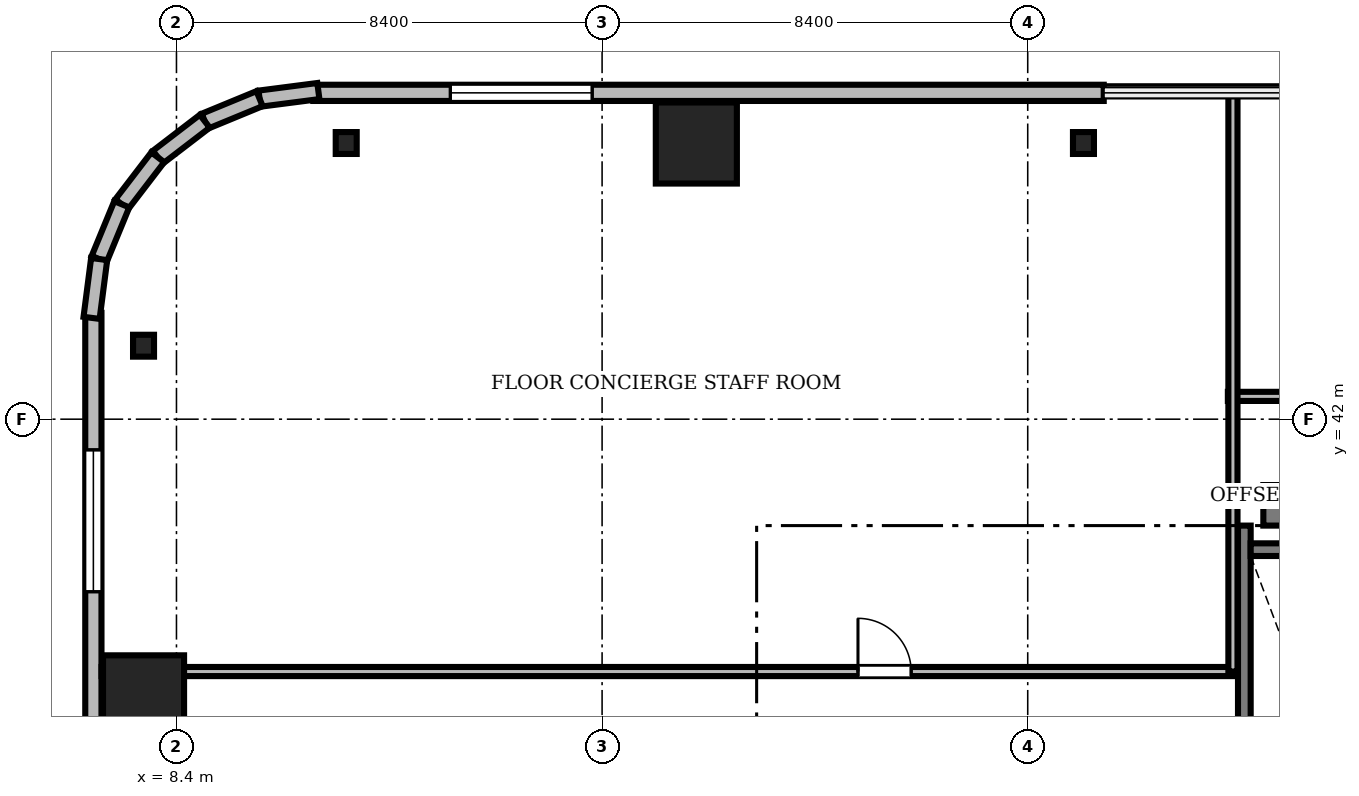
"""IFC4 building model, lengths in metres.
Left out: names, types, materials, properties, quantities, classifications, styles, units other than length and angle.
Written with IfcOpenShell. Run it as: python <this file> out.ifc"""

import sys

from ifc_helpers import new_model, si_unit, direction, frame, frame_2d, origin, origin_2d, place, context, subcontext, project, spatial, rectangle, i_section, extrude, source, transform, mapped, element, fill, save


model = new_model("IFC4")
c1 = context("Model", 3, precision=1e-05, world=origin(), true_north=direction((0.0, 1.0)))
c2 = subcontext(c1, "Body", "Model", "MODEL_VIEW")
j1 = project(units=[si_unit("LENGTHUNIT", "METRE"), si_unit("PLANEANGLEUNIT", "RADIAN")], contexts=[c1])
p1 = place(None, origin())
s1 = spatial("IfcSite", under=j1, at=p1, CompositionType="ELEMENT")
p2 = place(p1, origin())
s2 = spatial("IfcBuilding", under=s1, at=p2, CompositionType="ELEMENT")
p3 = place(p2, frame((0.0, 0.0, 133.5)))
s3 = spatial("IfcBuildingStorey", under=s2, at=p3, CompositionType="ELEMENT", Elevation=133.5)
m1 = source(origin(), c2, "Body", "SweptSolid", [
    extrude(rectangle(XDim=17.52, YDim=0.8, at=frame_2d((8.76, 0.0))), origin(), (0.0, 0.0, 1.0), 3.46),
])
p4 = place(p3, frame((29.85, 40.3, 0.0), z_axis=(0.0, 0.0, 1.0), x_axis=(1.0, 0.0, 0.0)))
e1 = element("IfcWall", 1, at=p4, inside=s3, PredefinedType="SHEAR", context=c2, shape_type="MappedRepresentation", body=[
    mapped(m1, transform((0.0, 0.0, 0.0), scale=1.0)),
])
m2 = source(origin(), c2, "Body", "SweptSolid", [
    extrude(rectangle(XDim=1.6, YDim=1.6, at=origin_2d()), origin(), (0.0, 0.0, 1.0), 3.46),
])
for number, where, z_axis, x_axis in (
    (2, (18.66, 47.45, 0.0), (0.0, 0.0, 1.0), (1.0, 0.0, 0.0)),
    (3, (7.75, 36.54, 0.0), (0.0, 0.0, 1.0), (1.0, 0.0, 0.0)),
):
    element("IfcColumn", number, at=place(p3, frame(where, z_axis=z_axis, x_axis=x_axis)), inside=s3, PredefinedType="COLUMN", context=c2, shape_type="MappedRepresentation", body=[
        mapped(m2, transform((0.0, 0.0, 0.0), scale=1.0)),
    ])
m3 = source(origin(), c2, "Body", "SweptSolid", [
    extrude(i_section(OverallWidth=0.414, OverallDepth=0.432, WebThickness=0.026, FlangeThickness=0.04, FilletRadius=0.015, at=origin_2d()), origin(), (0.0, 0.0, 1.0), 3.46),
])
for number, where, z_axis, x_axis in (
    (4, (26.3, 47.45, 0.0), (0.0, 0.0, 1.0), (1.0, 0.0, 0.0)),
    (5, (11.75, 47.45, 0.0), (0.0, 0.0, 1.0), (1.0, 0.0, 0.0)),
    (6, (7.75, 43.45, 0.0), (0.0, 0.0, 1.0), (1.0, 0.0, 0.0)),
):
    element("IfcColumn", number, at=place(p3, frame(where, z_axis=z_axis, x_axis=x_axis)), inside=s3, PredefinedType="COLUMN", context=c2, shape_type="MappedRepresentation", body=[
        mapped(m3, transform((0.0, 0.0, 0.0), scale=1.0)),
    ])
m4 = source(origin(), c2, "Body", "SweptSolid", [
    extrude(rectangle(XDim=15.6, YDim=0.32, at=frame_2d((7.8, 0.0))), origin(), (0.0, 0.0, 1.0), 3.46),
])
p5 = place(p3, frame((26.7, 48.44, 0.0), z_axis=(0.0, 0.0, 1.0), x_axis=(-1.0, 0.0, 0.0)))
e7 = element("IfcWall", 7, at=p5, inside=s3, PredefinedType="SOLIDWALL", context=c2, shape_type="MappedRepresentation", body=[
    mapped(m4, transform((0.0, 0.0, 0.0), scale=1.0)),
])
m5 = source(origin(), c2, "Body", "SweptSolid", [
    extrude(rectangle(XDim=2.8, YDim=2.4, at=frame_2d((1.4, 1.2))), frame((0.0, 0.17, 0.0), z_axis=(0.0, -1.0, 0.0), x_axis=(1.0, 0.0, 0.0)), (0.0, 0.0, 1.0), 0.34),
])
p6 = place(p5, frame((10.095, 0.0, 0.72)))
e8 = element("IfcOpeningElement", 8, at=p6, cuts=e7, PredefinedType="OPENING", context=c2, shape_type="MappedRepresentation", body=[
    mapped(m5, transform((0.0, 0.0, 0.0), scale=1.0)),
])
m6 = source(origin(), c2, "Body", "SweptSolid", [
    extrude(rectangle(XDim=15.6, YDim=0.32, at=frame_2d((7.8, 0.0))), origin(), (0.0, 0.0, 1.0), 3.46),
])
p7 = place(p3, frame((6.76, 44.1, 0.0), z_axis=(0.0, 0.0, 1.0), x_axis=(0.0, -1.0, 0.0)))
e9 = element("IfcWall", 9, at=p7, inside=s3, PredefinedType="SOLIDWALL", context=c2, shape_type="MappedRepresentation", body=[
    mapped(m6, transform((0.0, 0.0, 0.0), scale=1.0)),
])
m7 = source(origin(), c2, "Body", "SweptSolid", [
    extrude(rectangle(XDim=1.4, YDim=2.3, at=frame_2d((0.7, 1.15))), frame((0.0, 0.17, 0.0), z_axis=(0.0, -1.0, 0.0), x_axis=(1.0, 0.0, 0.0)), (0.0, 0.0, 1.0), 0.34),
])
p8 = place(p7, frame((9.61, 0.0, 0.0)))
e10 = element("IfcOpeningElement", 10, at=p8, cuts=e9, PredefinedType="OPENING", context=c2, shape_type="MappedRepresentation", body=[
    mapped(m7, transform((0.0, 0.0, 0.0), scale=1.0)),
])
p9 = place(p7, frame((2.705, 0.0, 0.72)))
e11 = element("IfcOpeningElement", 11, at=p9, cuts=e9, PredefinedType="OPENING", context=c2, shape_type="MappedRepresentation", body=[
    mapped(m5, transform((0.0, 0.0, 0.0), scale=1.0)),
])
m8 = source(origin(), c2, "Body", "SweptSolid", [
    extrude(rectangle(XDim=1.17, YDim=0.32, at=frame_2d((0.585, 0.0))), origin(), (0.0, 0.0, 1.0), 3.46),
])
p10 = place(p3, frame((11.2, 48.476, 0.0), z_axis=(0.0, 0.0, 1.0), x_axis=(-0.991735963317, -0.128295670475, 0.0)))
e12 = element("IfcWall", 12, at=p10, inside=s3, PredefinedType="SOLIDWALL", context=c2, shape_type="MappedRepresentation", body=[
    mapped(m8, transform((0.0, 0.0, 0.0), scale=1.0)),
])
m9 = source(origin(), c2, "Body", "SweptSolid", [
    extrude(rectangle(XDim=1.169, YDim=0.32, at=frame_2d((0.584, 0.0))), origin(), (0.0, 0.0, 1.0), 3.46),
])
p11 = place(p3, frame((10.04, 48.325, 0.0), z_axis=(0.0, 0.0, 1.0), x_axis=(-0.924552646638, -0.381054331552, 0.0)))
e13 = element("IfcWall", 13, at=p11, inside=s3, PredefinedType="SOLIDWALL", context=c2, shape_type="MappedRepresentation", body=[
    mapped(m9, transform((0.0, 0.0, 0.0), scale=1.0)),
])
m10 = source(origin(), c2, "Body", "SweptSolid", [
    extrude(rectangle(XDim=1.169, YDim=0.32, at=frame_2d((0.584, 0.0))), origin(), (0.0, 0.0, 1.0), 3.46),
])
p12 = place(p3, frame((8.959, 47.88, 0.0), z_axis=(0.0, 0.0, 1.0), x_axis=(-0.793663520347, -0.608356981114, 0.0)))
e14 = element("IfcWall", 14, at=p12, inside=s3, PredefinedType="SOLIDWALL", context=c2, shape_type="MappedRepresentation", body=[
    mapped(m10, transform((0.0, 0.0, 0.0), scale=1.0)),
])
m11 = source(origin(), c2, "Body", "SweptSolid", [
    extrude(rectangle(XDim=1.169, YDim=0.32, at=frame_2d((0.584, 0.0))), origin(), (0.0, 0.0, 1.0), 3.46),
])
p13 = place(p3, frame((8.031, 47.169, 0.0), z_axis=(0.0, 0.0, 1.0), x_axis=(-0.608387696831, -0.793639975269, 0.0)))
e15 = element("IfcWall", 15, at=p13, inside=s3, PredefinedType="SOLIDWALL", context=c2, shape_type="MappedRepresentation", body=[
    mapped(m11, transform((0.0, 0.0, 0.0), scale=1.0)),
])
p14 = place(p3, frame((7.32, 46.241, 0.0), z_axis=(0.0, 0.0, 1.0), x_axis=(-0.381054331552, -0.924552646638, 0.0)))
e16 = element("IfcWall", 16, at=p14, inside=s3, PredefinedType="SOLIDWALL", context=c2, shape_type="MappedRepresentation", body=[
    mapped(m9, transform((0.0, 0.0, 0.0), scale=1.0)),
])
p15 = place(p3, frame((6.875, 45.16, 0.0), z_axis=(0.0, 0.0, 1.0), x_axis=(-0.128295670475, -0.991735963317, 0.0)))
e17 = element("IfcWall", 17, at=p15, inside=s3, PredefinedType="SOLIDWALL", context=c2, shape_type="MappedRepresentation", body=[
    mapped(m8, transform((0.0, 0.0, 0.0), scale=1.0)),
])
m12 = source(origin(), c2, "Body", "SweptSolid", [
    extrude(rectangle(XDim=9.25, YDim=0.25, at=frame_2d((4.625, 0.0))), origin(), (0.0, 0.0, 1.0), 3.5),
])
p16 = place(p3, frame((29.475, 30.65, 0.0), z_axis=(0.0, 0.0, 1.0), x_axis=(0.0, 1.0, 0.0)))
e18 = element("IfcWall", 18, at=p16, inside=s3, PredefinedType="SOLIDWALL", context=c2, shape_type="MappedRepresentation", body=[
    mapped(m12, transform((0.0, 0.0, 0.0), scale=1.0)),
])
m13 = source(origin(), c2, "Body", "SweptSolid", [
    extrude(rectangle(XDim=3.15, YDim=0.25, at=frame_2d((1.575, 0.0))), origin(), (0.0, 0.0, 1.0), 3.5),
])
p17 = place(p3, frame((29.6, 39.425, 0.0), z_axis=(0.0, 0.0, 1.0), x_axis=(1.0, 0.0, 0.0)))
e19 = element("IfcWall", 19, at=p17, inside=s3, PredefinedType="SOLIDWALL", context=c2, shape_type="MappedRepresentation", body=[
    mapped(m13, transform((0.0, 0.0, 0.0), scale=1.0)),
])
m14 = source(origin(), c2, "Body", "SweptSolid", [
    extrude(rectangle(XDim=23.928, YDim=0.18, at=frame_2d((11.964, 0.0))), origin(), (0.0, 0.0, 1.0), 2.702),
])
p18 = place(p3, frame((29.15, 42.45, 0.0), z_axis=(0.0, 0.0, 1.0), x_axis=(1.0, 0.0, 0.0)))
e20 = element("IfcWall", 20, at=p18, inside=s3, PredefinedType="PARTITIONING", context=c2, shape_type="MappedRepresentation", body=[
    mapped(m14, transform((0.0, 0.0, 0.0), scale=1.0)),
])
m15 = source(origin(), c2, "Body", "SweptSolid", [
    extrude(rectangle(XDim=1.05, YDim=2.2, at=frame_2d((0.525, 1.1))), frame((0.0, 0.1, 0.0), z_axis=(0.0, -1.0, 0.0), x_axis=(1.0, 0.0, 0.0)), (0.0, 0.0, 1.0), 0.2),
])
p19 = place(p18, frame((4.5, 0.0, 0.0)))
e21 = element("IfcOpeningElement", 21, at=p19, cuts=e20, PredefinedType="OPENING", context=c2, shape_type="MappedRepresentation", body=[
    mapped(m15, transform((0.0, 0.0, 0.0), scale=1.0)),
])
m16 = source(origin(), c2, "Body", "SweptSolid", [
    extrude(rectangle(XDim=22.328, YDim=0.18, at=frame_2d((11.164, 0.0))), origin(), (0.0, 0.0, 1.0), 2.702),
])
p20 = place(p3, frame((6.922, 37.02, 0.0), z_axis=(0.0, 0.0, 1.0), x_axis=(1.0, 0.0, 0.0)))
e22 = element("IfcWall", 22, at=p20, inside=s3, PredefinedType="PARTITIONING", context=c2, shape_type="MappedRepresentation", body=[
    mapped(m16, transform((0.0, 0.0, 0.0), scale=1.0)),
])
p21 = place(p20, frame((14.928, 0.0, 0.0)))
e23 = element("IfcOpeningElement", 23, at=p21, cuts=e22, PredefinedType="OPENING", context=c2, shape_type="MappedRepresentation", body=[
    mapped(m15, transform((0.0, 0.0, 0.0), scale=1.0)),
])
m17 = source(origin(), c2, "Body", "SweptSolid", [
    extrude(rectangle(XDim=11.45, YDim=0.18, at=frame_2d((5.725, 0.0))), origin(), (0.0, 0.0, 1.0), 2.702),
])
p22 = place(p3, frame((29.25, 37.02, 0.0), z_axis=(0.0, 0.0, 1.0), x_axis=(0.0, 1.0, 0.0)))
e24 = element("IfcWall", 24, at=p22, inside=s3, PredefinedType="PARTITIONING", context=c2, shape_type="MappedRepresentation", body=[
    mapped(m17, transform((0.0, 0.0, 0.0), scale=1.0)),
])
m18 = source(origin(), c2, "Body", "SweptSolid", [
    extrude(rectangle(XDim=2.8, YDim=2.4, at=frame_2d((1.4, 1.2))), frame((0.0, 0.03, 0.0), z_axis=(0.0, -1.0, 0.0), x_axis=(1.0, 0.0, 0.0)), (0.0, 0.0, 1.0), 0.06),
])
p23 = place(p6, origin())
e25 = element("IfcWindow", 25, at=p23, inside=s3, PartitioningType="SINGLE_PANEL", PredefinedType="WINDOW", context=c2, shape_type="MappedRepresentation", body=[
    mapped(m18, transform((0.0, 0.0, 0.0), scale=1.0)),
])
fill(e8, e25)
p24 = place(p9, origin())
e26 = element("IfcWindow", 26, at=p24, inside=s3, PartitioningType="SINGLE_PANEL", PredefinedType="WINDOW", context=c2, shape_type="MappedRepresentation", body=[
    mapped(m18, transform((0.0, 0.0, 0.0), scale=1.0)),
])
fill(e11, e26)
m19 = source(origin(), c2, "Body", "SweptSolid", [
    extrude(rectangle(XDim=1.05, YDim=2.2, at=frame_2d((0.525, 1.1))), frame((0.0, 0.025, 0.0), z_axis=(0.0, -1.0, 0.0), x_axis=(1.0, 0.0, 0.0)), (0.0, 0.0, 1.0), 0.05),
])
p25 = place(p21, origin())
e27 = element("IfcDoor", 27, at=p25, inside=s3, OperationType="SINGLE_SWING_LEFT", PredefinedType="DOOR", context=c2, shape_type="MappedRepresentation", body=[
    mapped(m19, transform((0.0, 0.0, 0.0), scale=1.0)),
])
fill(e23, e27)
save(model, sys.argv[1])
